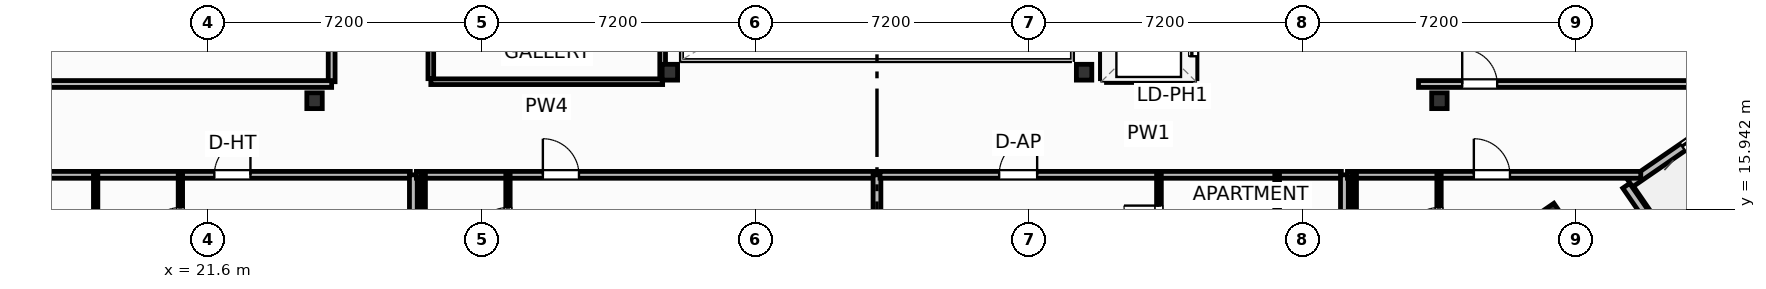
"""IFC4 building model, lengths in metres.
Left out: names, types, materials, properties, quantities, classifications, styles, units other than length and angle.
Written with IfcOpenShell. Run it as: python <this file> out.ifc"""

import sys

from ifc_helpers import new_model, si_unit, direction, frame, frame_2d, origin, origin_2d, place, context, subcontext, project, spatial, rectangle, i_section, extrude, element, fill, save


model = new_model("IFC4")
c1 = context("Model", 3, precision=1e-05, world=origin(), true_north=direction((0.0, 1.0)))
c2 = subcontext(c1, "Body", "Model", "MODEL_VIEW")
j1 = project(units=[si_unit("LENGTHUNIT", "METRE"), si_unit("PLANEANGLEUNIT", "RADIAN")], contexts=[c1])
p1 = place(None, origin())
s1 = spatial("IfcSite", under=j1, at=p1, CompositionType="ELEMENT")
p2 = place(p1, origin())
s2 = spatial("IfcBuilding", under=s1, at=p2, CompositionType="ELEMENT")
p3 = place(p2, frame((0.0, 0.0, 273.0)))
s3 = spatial("IfcBuildingStorey", under=s2, at=p3, CompositionType="ELEMENT", Elevation=273.0)
for number, where, z_axis, x_axis in (
    (1, (33.75, 19.55, 0.0), (0.0, 0.0, 1.0), (1.0, 0.0, 0.0)),
    (2, (44.65, 19.55, 0.0), (0.0, 0.0, 1.0), (1.0, 0.0, 0.0)),
    (3, (24.4, 18.8, 0.0), (0.0, 0.0, 1.0), (1.0, 0.0, 0.0)),
    (4, (54.0, 18.8, 0.0), (0.0, 0.0, 1.0), (1.0, 0.0, 0.0)),
):
    element("IfcColumn", number, at=place(p3, frame(where, z_axis=z_axis, x_axis=x_axis)), inside=s3, PredefinedType="COLUMN", context=c2, shape_type="SweptSolid", body=[
        extrude(i_section(OverallWidth=0.406, OverallDepth=0.416, WebThickness=0.03, FlangeThickness=0.048, FilletRadius=0.025, at=origin_2d()), origin(), (0.0, 0.0, 1.0), 3.7),
    ])
p4 = place(p3, frame((56.96, 15.823, 0.0), z_axis=(0.0, 0.0, 1.0), x_axis=(0.823532597628, 0.567268949127, 0.0)))
e5 = element("IfcColumn", 5, at=p4, inside=s3, PredefinedType="COLUMN", context=c2, shape_type="SweptSolid", body=[
    extrude(i_section(OverallWidth=0.401, OverallDepth=0.399, WebThickness=0.025, FlangeThickness=0.04, FilletRadius=0.022, at=origin_2d()), origin(), (0.0, 0.0, 1.0), 3.7),
])
p5 = place(p3, frame((63.605, 19.78, 0.0), z_axis=(0.0, 0.0, 1.0), x_axis=(-0.823541290762, -0.567256328665, 0.0)))
e6 = element("IfcWall", 6, at=p5, inside=s3, PredefinedType="SOLIDWALL", context=c2, shape_type="SweptSolid", body=[
    extrude(rectangle(XDim=5.567, YDim=0.22, at=frame_2d((2.784, 0.0))), origin(), (0.0, 0.0, 1.0), 2.73),
])
p6 = place(p5, frame((1.787, 0.0, 0.0)))
e7 = element("IfcOpeningElement", 7, at=p6, cuts=e6, PredefinedType="OPENING", context=c2, shape_type="SweptSolid", body=[
    extrude(rectangle(XDim=2.1, YDim=2.3, at=frame_2d((1.05, 1.15))), frame((0.0, 0.12, 0.0), z_axis=(0.0, -1.0, 0.0), x_axis=(1.0, 0.0, 0.0)), (0.0, 0.0, 1.0), 0.24),
])
p7 = place(p3, frame((60.036, 14.936, 0.0), z_axis=(0.0, 0.0, 1.0), x_axis=(-0.567273565974, 0.823529417415, 0.0)))
e8 = element("IfcWall", 8, at=p7, inside=s3, PredefinedType="SOLIDWALL", context=c2, shape_type="SweptSolid", body=[
    extrude(rectangle(XDim=1.975, YDim=0.22, at=frame_2d((0.988, 0.0))), origin(), (0.0, 0.0, 1.0), 2.73),
])
p8 = place(p3, frame((5.038, 16.85, 0.0), z_axis=(0.0, 0.0, 1.0), x_axis=(1.0, 0.0, 0.0)))
e9 = element("IfcWall", 9, at=p8, inside=s3, PredefinedType="PARTITIONING", context=c2, shape_type="SweptSolid", body=[
    extrude(rectangle(XDim=21.882, YDim=0.18, at=frame_2d((10.941, 0.0))), origin(), (0.0, 0.0, 1.0), 2.739),
])
p9 = place(p8, frame((16.725, 0.0, 0.0)))
e10 = element("IfcOpeningElement", 10, at=p9, cuts=e9, PredefinedType="OPENING", context=c2, shape_type="SweptSolid", body=[
    extrude(rectangle(XDim=0.95, YDim=2.15, at=frame_2d((0.475, 1.075))), frame((0.0, 0.1, 0.0), z_axis=(0.0, -1.0, 0.0), x_axis=(1.0, 0.0, 0.0)), (0.0, 0.0, 1.0), 0.2),
])
p10 = place(p3, frame((20.87, 14.33, 0.0), z_axis=(0.0, 0.0, 1.0), x_axis=(0.0, 1.0, 0.0)))
e11 = element("IfcWall", 11, at=p10, inside=s3, PredefinedType="PARTITIONING", context=c2, shape_type="SweptSolid", body=[
    extrude(rectangle(XDim=2.52, YDim=0.115, at=frame_2d((1.26, 0.0))), origin(), (0.0, 0.0, 1.0), 3.45),
])
p11 = place(p10, frame((0.76, 0.0, 0.0)))
e12 = element("IfcOpeningElement", 12, at=p11, cuts=e11, PredefinedType="OPENING", context=c2, shape_type="SweptSolid", body=[
    extrude(rectangle(XDim=0.9, YDim=2.05, at=frame_2d((0.45, 1.025))), frame((0.0, 0.067, 0.0), z_axis=(0.0, -1.0, 0.0), x_axis=(1.0, 0.0, 0.0)), (0.0, 0.0, 1.0), 0.135),
])
p12 = place(p3, frame((18.64, 14.33, 0.0), z_axis=(0.0, 0.0, 1.0), x_axis=(0.0, 1.0, 0.0)))
e13 = element("IfcWall", 13, at=p12, inside=s3, PredefinedType="PARTITIONING", context=c2, shape_type="SweptSolid", body=[
    extrude(rectangle(XDim=2.52, YDim=0.115, at=frame_2d((1.26, 0.0))), origin(), (0.0, 0.0, 1.0), 3.45),
])
p13 = place(p3, frame((27.0, -4.0, 0.0), z_axis=(0.0, 0.0, 1.0), x_axis=(0.0, 1.0, 0.0)))
e14 = element("IfcWall", 14, at=p13, inside=s3, PredefinedType="PARTITIONING", context=c2, shape_type="SweptSolid", body=[
    extrude(rectangle(XDim=20.85, YDim=0.205, at=frame_2d((10.425, 0.0))), origin(), (0.0, 0.0, 1.0), 3.45),
])
p14 = place(p3, frame((27.08, 16.85, 0.0), z_axis=(0.0, 0.0, 1.0), x_axis=(1.0, 0.0, 0.0)))
e15 = element("IfcWall", 15, at=p14, inside=s3, PredefinedType="PARTITIONING", context=c2, shape_type="SweptSolid", body=[
    extrude(rectangle(XDim=12.04, YDim=0.18, at=frame_2d((6.02, 0.0))), origin(), (0.0, 0.0, 1.0), 3.45),
])
p15 = place(p14, frame((3.328, 0.0, 0.0)))
e16 = element("IfcOpeningElement", 16, at=p15, cuts=e15, PredefinedType="OPENING", context=c2, shape_type="SweptSolid", body=[
    extrude(rectangle(XDim=0.95, YDim=2.15, at=frame_2d((0.475, 1.075))), frame((0.0, 0.1, 0.0), z_axis=(0.0, -1.0, 0.0), x_axis=(1.0, 0.0, 0.0)), (0.0, 0.0, 1.0), 0.2),
])
p16 = place(p3, frame((29.49, 14.33, 0.0), z_axis=(0.0, 0.0, 1.0), x_axis=(0.0, 1.0, 0.0)))
e17 = element("IfcWall", 17, at=p16, inside=s3, PredefinedType="PARTITIONING", context=c2, shape_type="SweptSolid", body=[
    extrude(rectangle(XDim=2.52, YDim=0.115, at=frame_2d((1.26, 0.0))), origin(), (0.0, 0.0, 1.0), 3.45),
])
p17 = place(p16, frame((0.76, 0.0, 0.0)))
e18 = element("IfcOpeningElement", 18, at=p17, cuts=e17, PredefinedType="OPENING", context=c2, shape_type="SweptSolid", body=[
    extrude(rectangle(XDim=0.9, YDim=2.05, at=frame_2d((0.45, 1.025))), frame((0.0, 0.067, 0.0), z_axis=(0.0, -1.0, 0.0), x_axis=(1.0, 0.0, 0.0)), (0.0, 0.0, 1.0), 0.135),
])
p18 = place(p3, frame((27.26, 14.33, 0.0), z_axis=(0.0, 0.0, 1.0), x_axis=(0.0, 1.0, 0.0)))
e19 = element("IfcWall", 19, at=p18, inside=s3, PredefinedType="PARTITIONING", context=c2, shape_type="SweptSolid", body=[
    extrude(rectangle(XDim=2.52, YDim=0.115, at=frame_2d((1.26, 0.0))), origin(), (0.0, 0.0, 1.0), 3.45),
])
p19 = place(p3, frame((39.2, 3.006, 0.0), z_axis=(0.0, 0.0, 1.0), x_axis=(0.0, 1.0, 0.0)))
e20 = element("IfcWall", 20, at=p19, inside=s3, PredefinedType="PARTITIONING", context=c2, shape_type="SweptSolid", body=[
    extrude(rectangle(XDim=13.844, YDim=0.205, at=frame_2d((6.922, 0.0))), origin(), (0.0, 0.0, 1.0), 3.45),
])
p20 = place(p3, frame((39.28, 16.85, 0.0), z_axis=(0.0, 0.0, 1.0), x_axis=(1.0, 0.0, 0.0)))
e21 = element("IfcWall", 21, at=p20, inside=s3, PredefinedType="PARTITIONING", context=c2, shape_type="SweptSolid", body=[
    extrude(rectangle(XDim=12.14, YDim=0.18, at=frame_2d((6.07, 0.0))), origin(), (0.0, 0.0, 1.0), 3.45),
])
p21 = place(p20, frame((3.135, 0.0, 0.0)))
e22 = element("IfcOpeningElement", 22, at=p21, cuts=e21, PredefinedType="OPENING", context=c2, shape_type="SweptSolid", body=[
    extrude(rectangle(XDim=1.0, YDim=2.2, at=frame_2d((0.5, 1.1))), frame((0.0, 0.1, 0.0), z_axis=(0.0, -1.0, 0.0), x_axis=(1.0, 0.0, 0.0)), (0.0, 0.0, 1.0), 0.2),
])
p22 = place(p3, frame((46.62, 5.567, 0.0), z_axis=(0.0, 0.0, 1.0), x_axis=(0.0, 1.0, 0.0)))
e23 = element("IfcWall", 23, at=p22, inside=s3, PredefinedType="PARTITIONING", context=c2, shape_type="SweptSolid", body=[
    extrude(rectangle(XDim=11.283, YDim=0.125, at=frame_2d((5.642, 0.0))), origin(), (0.0, 0.0, 1.0), 3.45),
])
p23 = place(p22, frame((4.757, 0.0, 0.0)))
e24 = element("IfcOpeningElement", 24, at=p23, cuts=e23, PredefinedType="OPENING", context=c2, shape_type="SweptSolid", body=[
    extrude(rectangle(XDim=0.92, YDim=2.05, at=frame_2d((0.46, 1.025))), frame((0.0, 0.073, 0.0), z_axis=(0.0, -1.0, 0.0), x_axis=(1.0, 0.0, 0.0)), (0.0, 0.0, 1.0), 0.145),
])
p24 = place(p22, frame((7.26, 0.0, 0.0)))
e25 = element("IfcOpeningElement", 25, at=p24, cuts=e23, PredefinedType="OPENING", context=c2, shape_type="SweptSolid", body=[
    extrude(rectangle(XDim=0.9, YDim=2.05, at=frame_2d((0.45, 1.025))), frame((0.0, 0.073, 0.0), z_axis=(0.0, -1.0, 0.0), x_axis=(1.0, 0.0, 0.0)), (0.0, 0.0, 1.0), 0.145),
])
p25 = place(p22, frame((9.553, 0.0, 0.0)))
e26 = element("IfcOpeningElement", 26, at=p25, cuts=e23, PredefinedType="OPENING", context=c2, shape_type="SweptSolid", body=[
    extrude(rectangle(XDim=0.92, YDim=2.05, at=frame_2d((0.46, 1.025))), frame((0.0, 0.073, 0.0), z_axis=(0.0, -1.0, 0.0), x_axis=(1.0, 0.0, 0.0)), (0.0, 0.0, 1.0), 0.145),
])
p26 = place(p3, frame((49.73, 14.44, 0.0), z_axis=(0.0, 0.0, 1.0), x_axis=(0.0, 1.0, 0.0)))
e27 = element("IfcWall", 27, at=p26, inside=s3, PredefinedType="PARTITIONING", context=c2, shape_type="SweptSolid", body=[
    extrude(rectangle(XDim=2.41, YDim=0.125, at=frame_2d((1.205, 0.0))), origin(), (0.0, 0.0, 1.0), 3.45),
])
p27 = place(p3, frame((51.5, 11.479, 0.0), z_axis=(0.0, 0.0, 1.0), x_axis=(0.0, 1.0, 0.0)))
e28 = element("IfcWall", 28, at=p27, inside=s3, PredefinedType="PARTITIONING", context=c2, shape_type="SweptSolid", body=[
    extrude(rectangle(XDim=5.372, YDim=0.205, at=frame_2d((2.686, 0.0))), origin(), (0.0, 0.0, 1.0), 3.45),
])
p28 = place(p3, frame((51.58, 16.85, 0.0), z_axis=(0.0, 0.0, 1.0), x_axis=(1.0, 0.0, 0.0)))
e29 = element("IfcWall", 29, at=p28, inside=s3, PredefinedType="PARTITIONING", context=c2, shape_type="SweptSolid", body=[
    extrude(rectangle(XDim=7.718, YDim=0.18, at=frame_2d((3.859, 0.0))), origin(), (0.0, 0.0, 1.0), 3.45),
])
p29 = place(p28, frame((3.326, 0.0, 0.0)))
e30 = element("IfcOpeningElement", 30, at=p29, cuts=e29, PredefinedType="OPENING", context=c2, shape_type="SweptSolid", body=[
    extrude(rectangle(XDim=0.95, YDim=2.15, at=frame_2d((0.475, 1.075))), frame((0.0, 0.1, 0.0), z_axis=(0.0, -1.0, 0.0), x_axis=(1.0, 0.0, 0.0)), (0.0, 0.0, 1.0), 0.2),
])
p30 = place(p3, frame((53.99, 14.33, 0.0), z_axis=(0.0, 0.0, 1.0), x_axis=(0.0, 1.0, 0.0)))
e31 = element("IfcWall", 31, at=p30, inside=s3, PredefinedType="PARTITIONING", context=c2, shape_type="SweptSolid", body=[
    extrude(rectangle(XDim=2.52, YDim=0.115, at=frame_2d((1.26, 0.0))), origin(), (0.0, 0.0, 1.0), 3.45),
])
p31 = place(p30, frame((0.76, 0.0, 0.0)))
e32 = element("IfcOpeningElement", 32, at=p31, cuts=e31, PredefinedType="OPENING", context=c2, shape_type="SweptSolid", body=[
    extrude(rectangle(XDim=0.9, YDim=2.05, at=frame_2d((0.45, 1.025))), frame((0.0, 0.067, 0.0), z_axis=(0.0, -1.0, 0.0), x_axis=(1.0, 0.0, 0.0)), (0.0, 0.0, 1.0), 0.135),
])
p32 = place(p3, frame((51.76, 14.33, 0.0), z_axis=(0.0, 0.0, 1.0), x_axis=(0.0, 1.0, 0.0)))
e33 = element("IfcWall", 33, at=p32, inside=s3, PredefinedType="PARTITIONING", context=c2, shape_type="SweptSolid", body=[
    extrude(rectangle(XDim=2.52, YDim=0.115, at=frame_2d((1.26, 0.0))), origin(), (0.0, 0.0, 1.0), 3.45),
])
p33 = place(p3, frame((24.85, 19.3, 0.0), z_axis=(0.0, 0.0, 1.0), x_axis=(0.0, 1.0, 0.0)))
e34 = element("IfcWall", 34, at=p33, inside=s3, PredefinedType="PARTITIONING", context=c2, shape_type="SweptSolid", body=[
    extrude(rectangle(XDim=3.57, YDim=0.18, at=frame_2d((1.785, 0.0))), origin(), (0.0, 0.0, 1.0), 3.45),
])
p34 = place(p33, frame((1.5, 0.0, 0.0)))
e35 = element("IfcOpeningElement", 35, at=p34, cuts=e34, PredefinedType="OPENING", context=c2, shape_type="SweptSolid", body=[
    extrude(rectangle(XDim=0.92, YDim=2.05, at=frame_2d((0.46, 1.025))), frame((0.0, 0.1, 0.0), z_axis=(0.0, -1.0, 0.0), x_axis=(1.0, 0.0, 0.0)), (0.0, 0.0, 1.0), 0.2),
])
p35 = place(p3, frame((3.392, 19.24, 0.0), z_axis=(0.0, 0.0, 1.0), x_axis=(1.0, 0.0, 0.0)))
e36 = element("IfcWall", 36, at=p35, inside=s3, PredefinedType="PARTITIONING", context=c2, shape_type="SweptSolid", body=[
    extrude(rectangle(XDim=21.458, YDim=0.18, at=frame_2d((10.729, 0.0))), origin(), (0.0, 0.0, 1.0), 3.45),
])
p36 = place(p3, frame((53.45, 19.24, 0.0), z_axis=(0.0, 0.0, 1.0), x_axis=(1.0, 0.0, 0.0)))
e37 = element("IfcWall", 37, at=p36, inside=s3, PredefinedType="PARTITIONING", context=c2, shape_type="SweptSolid", body=[
    extrude(rectangle(XDim=9.318, YDim=0.18, at=frame_2d((4.659, 0.0))), origin(), (0.0, 0.0, 1.0), 2.739),
])
p37 = place(p36, frame((1.15, 0.0, 0.0)))
e38 = element("IfcOpeningElement", 38, at=p37, cuts=e37, PredefinedType="OPENING", context=c2, shape_type="SweptSolid", body=[
    extrude(rectangle(XDim=0.92, YDim=2.05, at=frame_2d((0.46, 1.025))), frame((0.0, 0.1, 0.0), z_axis=(0.0, -1.0, 0.0), x_axis=(1.0, 0.0, 0.0)), (0.0, 0.0, 1.0), 0.2),
])
p38 = place(p3, frame((27.46, 19.3, 0.0), z_axis=(0.0, 0.0, 1.0), x_axis=(1.0, 0.0, 0.0)))
e39 = element("IfcWall", 39, at=p38, inside=s3, PredefinedType="PARTITIONING", context=c2, shape_type="SweptSolid", body=[
    extrude(rectangle(XDim=6.1, YDim=0.15, at=frame_2d((3.05, 0.0))), origin(), (0.0, 0.0, 1.0), 2.662),
])
p39 = place(p3, frame((27.46, 19.38, 0.0), z_axis=(0.0, 0.0, 1.0), x_axis=(0.0, 1.0, 0.0)))
e40 = element("IfcWall", 40, at=p39, inside=s3, PredefinedType="PARTITIONING", context=c2, shape_type="SweptSolid", body=[
    extrude(rectangle(XDim=7.16, YDim=0.15, at=frame_2d((3.58, 0.0))), origin(), (0.0, 0.0, 1.0), 3.45),
])
p40 = place(p39, frame((1.1, 0.0, 0.0)))
e41 = element("IfcOpeningElement", 41, at=p40, cuts=e40, PredefinedType="OPENING", context=c2, shape_type="SweptSolid", body=[
    extrude(rectangle(XDim=0.95, YDim=2.05, at=frame_2d((0.475, 1.025))), frame((0.0, 0.085, 0.0), z_axis=(0.0, -1.0, 0.0), x_axis=(1.0, 0.0, 0.0)), (0.0, 0.0, 1.0), 0.17),
])
p41 = place(p3, frame((33.56, 19.38, 0.0), z_axis=(0.0, 0.0, 1.0), x_axis=(0.0, 1.0, 0.0)))
e42 = element("IfcWall", 42, at=p41, inside=s3, PredefinedType="PARTITIONING", context=c2, shape_type="SweptSolid", body=[
    extrude(rectangle(XDim=7.16, YDim=0.15, at=frame_2d((3.58, 0.0))), origin(), (0.0, 0.0, 1.0), 2.824),
])
p42 = place(p3, frame((45.24, 19.38, 0.0), z_axis=(0.0, 0.0, 1.0), x_axis=(1.0, 0.0, 0.0)))
e43 = element("IfcWall", 43, at=p42, inside=s3, PredefinedType="PARTITIONING", context=c2, shape_type="SweptSolid", body=[
    extrude(rectangle(XDim=2.22, YDim=0.2, at=frame_2d((1.11, 0.0))), origin(), (0.0, 0.0, 1.0), 2.662),
])
p43 = place(p3, frame((45.18, 19.38, 0.0), z_axis=(0.0, 0.0, 1.0), x_axis=(0.0, 1.0, 0.0)))
e44 = element("IfcWall", 44, at=p43, inside=s3, PredefinedType="PARTITIONING", context=c2, shape_type="SweptSolid", body=[
    extrude(rectangle(XDim=6.9, YDim=0.2, at=frame_2d((3.45, 0.0))), origin(), (0.0, 0.0, 1.0), 3.45),
])
p44 = place(p3, frame((47.52, 19.38, 0.0), z_axis=(0.0, 0.0, 1.0), x_axis=(0.0, 1.0, 0.0)))
e45 = element("IfcWall", 45, at=p44, inside=s3, PredefinedType="PARTITIONING", context=c2, shape_type="SweptSolid", body=[
    extrude(rectangle(XDim=6.9, YDim=0.2, at=frame_2d((3.45, 0.0))), origin(), (0.0, 0.0, 1.0), 3.45),
])
p45 = place(p44, frame((0.59, 0.0, 0.0)))
e46 = element("IfcOpeningElement", 46, at=p45, cuts=e45, PredefinedType="OPENING", context=c2, shape_type="SweptSolid", body=[
    extrude(rectangle(XDim=1.1, YDim=2.15, at=frame_2d((0.55, 1.075))), frame((0.0, 0.11, 0.0), z_axis=(0.0, -1.0, 0.0), x_axis=(1.0, 0.0, 0.0)), (0.0, 0.0, 1.0), 0.22),
])
p46 = place(p44, frame((2.89, 0.0, 0.0)))
e47 = element("IfcOpeningElement", 47, at=p46, cuts=e45, PredefinedType="OPENING", context=c2, shape_type="SweptSolid", body=[
    extrude(rectangle(XDim=1.1, YDim=2.15, at=frame_2d((0.55, 1.075))), frame((0.0, 0.11, 0.0), z_axis=(0.0, -1.0, 0.0), x_axis=(1.0, 0.0, 0.0)), (0.0, 0.0, 1.0), 0.22),
])
p47 = place(p44, frame((5.19, 0.0, 0.0)))
e48 = element("IfcOpeningElement", 48, at=p47, cuts=e45, PredefinedType="OPENING", context=c2, shape_type="SweptSolid", body=[
    extrude(rectangle(XDim=1.1, YDim=2.15, at=frame_2d((0.55, 1.075))), frame((0.0, 0.11, 0.0), z_axis=(0.0, -1.0, 0.0), x_axis=(1.0, 0.0, 0.0)), (0.0, 0.0, 1.0), 0.22),
])
p48 = place(p6, origin())
e49 = element("IfcDoor", 49, at=p48, inside=s3, OperationType="SLIDING_TO_LEFT", PredefinedType="DOOR", context=c2, shape_type="SweptSolid", body=[
    extrude(rectangle(XDim=2.1, YDim=2.3, at=frame_2d((1.05, 1.15))), frame((0.0, 0.025, 0.0), z_axis=(0.0, -1.0, 0.0), x_axis=(1.0, 0.0, 0.0)), (0.0, 0.0, 1.0), 0.05),
])
fill(e7, e49)
p49 = place(p9, origin())
e50 = element("IfcDoor", 50, at=p49, inside=s3, OperationType="SINGLE_SWING_RIGHT", PredefinedType="DOOR", context=c2, shape_type="SweptSolid", body=[
    extrude(rectangle(XDim=0.95, YDim=2.15, at=frame_2d((0.475, 1.075))), frame((0.0, 0.025, 0.0), z_axis=(0.0, -1.0, 0.0), x_axis=(1.0, 0.0, 0.0)), (0.0, 0.0, 1.0), 0.05),
])
fill(e10, e50)
p50 = place(p11, origin())
e51 = element("IfcDoor", 51, at=p50, inside=s3, OperationType="SINGLE_SWING_LEFT", PredefinedType="DOOR", context=c2, shape_type="SweptSolid", body=[
    extrude(rectangle(XDim=0.9, YDim=2.05, at=frame_2d((0.45, 1.025))), frame((0.0, 0.025, 0.0), z_axis=(0.0, -1.0, 0.0), x_axis=(1.0, 0.0, 0.0)), (0.0, 0.0, 1.0), 0.05),
])
fill(e12, e51)
p51 = place(p15, origin())
e52 = element("IfcDoor", 52, at=p51, inside=s3, OperationType="SINGLE_SWING_LEFT", PredefinedType="DOOR", context=c2, shape_type="SweptSolid", body=[
    extrude(rectangle(XDim=0.95, YDim=2.15, at=frame_2d((0.475, 1.075))), frame((0.0, 0.025, 0.0), z_axis=(0.0, -1.0, 0.0), x_axis=(1.0, 0.0, 0.0)), (0.0, 0.0, 1.0), 0.05),
])
fill(e16, e52)
p52 = place(p17, origin())
e53 = element("IfcDoor", 53, at=p52, inside=s3, OperationType="SINGLE_SWING_LEFT", PredefinedType="DOOR", context=c2, shape_type="SweptSolid", body=[
    extrude(rectangle(XDim=0.9, YDim=2.05, at=frame_2d((0.45, 1.025))), frame((0.0, 0.025, 0.0), z_axis=(0.0, -1.0, 0.0), x_axis=(1.0, 0.0, 0.0)), (0.0, 0.0, 1.0), 0.05),
])
fill(e18, e53)
p53 = place(p21, origin())
e54 = element("IfcDoor", 54, at=p53, inside=s3, OperationType="SINGLE_SWING_RIGHT", PredefinedType="DOOR", context=c2, shape_type="SweptSolid", body=[
    extrude(rectangle(XDim=1.0, YDim=2.2, at=frame_2d((0.5, 1.1))), frame((0.0, 0.025, 0.0), z_axis=(0.0, -1.0, 0.0), x_axis=(1.0, 0.0, 0.0)), (0.0, 0.0, 1.0), 0.05),
])
fill(e22, e54)
p54 = place(p25, origin())
e55 = element("IfcDoor", 55, at=p54, inside=s3, OperationType="SINGLE_SWING_RIGHT", PredefinedType="DOOR", context=c2, shape_type="SweptSolid", body=[
    extrude(rectangle(XDim=0.92, YDim=2.05, at=frame_2d((0.46, 1.025))), frame((0.0, 0.025, 0.0), z_axis=(0.0, -1.0, 0.0), x_axis=(1.0, 0.0, 0.0)), (0.0, 0.0, 1.0), 0.05),
])
fill(e26, e55)
p55 = place(p29, origin())
e56 = element("IfcDoor", 56, at=p55, inside=s3, OperationType="SINGLE_SWING_LEFT", PredefinedType="DOOR", context=c2, shape_type="SweptSolid", body=[
    extrude(rectangle(XDim=0.95, YDim=2.15, at=frame_2d((0.475, 1.075))), frame((0.0, 0.025, 0.0), z_axis=(0.0, -1.0, 0.0), x_axis=(1.0, 0.0, 0.0)), (0.0, 0.0, 1.0), 0.05),
])
fill(e30, e56)
p56 = place(p31, origin())
e57 = element("IfcDoor", 57, at=p56, inside=s3, OperationType="SINGLE_SWING_LEFT", PredefinedType="DOOR", context=c2, shape_type="SweptSolid", body=[
    extrude(rectangle(XDim=0.9, YDim=2.05, at=frame_2d((0.45, 1.025))), frame((0.0, 0.025, 0.0), z_axis=(0.0, -1.0, 0.0), x_axis=(1.0, 0.0, 0.0)), (0.0, 0.0, 1.0), 0.05),
])
fill(e32, e57)
p57 = place(p37, origin())
e58 = element("IfcDoor", 58, at=p57, inside=s3, OperationType="SINGLE_SWING_LEFT", PredefinedType="DOOR", context=c2, shape_type="SweptSolid", body=[
    extrude(rectangle(XDim=0.92, YDim=2.05, at=frame_2d((0.46, 1.025))), frame((0.0, 0.025, 0.0), z_axis=(0.0, -1.0, 0.0), x_axis=(1.0, 0.0, 0.0)), (0.0, 0.0, 1.0), 0.05),
])
fill(e38, e58)
p58 = place(p45, origin())
e59 = element("IfcDoor", 59, at=p58, inside=s3, OperationType="SLIDING_TO_LEFT", PredefinedType="DOOR", context=c2, shape_type="SweptSolid", body=[
    extrude(rectangle(XDim=1.1, YDim=2.15, at=frame_2d((0.55, 1.075))), frame((0.0, 0.025, 0.0), z_axis=(0.0, -1.0, 0.0), x_axis=(1.0, 0.0, 0.0)), (0.0, 0.0, 1.0), 0.05),
])
fill(e46, e59)
save(model, sys.argv[1])
